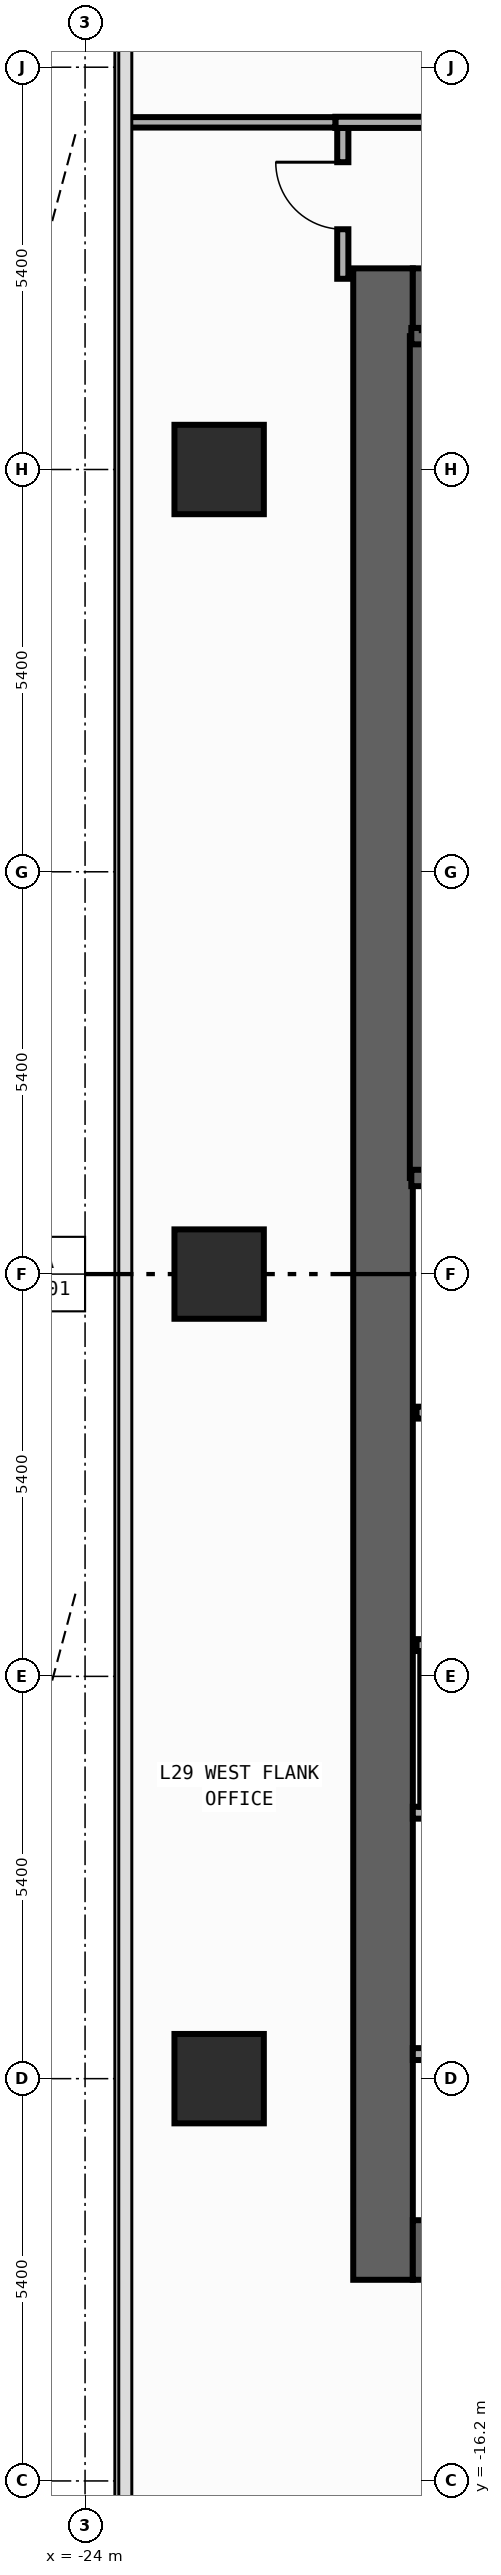
"""IFC4 building model, lengths in metres.
Left out: names, types, materials, properties, quantities, classifications, styles, units other than length and angle.
Written with IfcOpenShell. Run it as: python <this file> out.ifc"""

import sys

from ifc_helpers import new_model, si_unit, direction, frame, frame_2d, origin, origin_2d, place, context, subcontext, project, spatial, rectangle, extrude, element, fill, save


model = new_model("IFC4")
c1 = context("Model", 3, precision=1e-05, world=origin(), true_north=direction((0.0, 1.0)))
c2 = subcontext(c1, "Body", "Model", "MODEL_VIEW")
j1 = project(units=[si_unit("LENGTHUNIT", "METRE"), si_unit("PLANEANGLEUNIT", "RADIAN")], contexts=[c1])
p1 = place(None, origin())
s1 = spatial("IfcSite", under=j1, at=p1, CompositionType="ELEMENT")
p2 = place(p1, origin())
s2 = spatial("IfcBuilding", under=s1, at=p2, CompositionType="ELEMENT")
p3 = place(p2, frame((0.0, 0.0, 126.8)))
s3 = spatial("IfcBuildingStorey", under=s2, at=p3, CompositionType="ELEMENT", Elevation=126.8)
p4 = place(p3, frame((-20.0, -13.5, 0.0), z_axis=(0.0, 0.0, 1.0), x_axis=(0.0, 1.0, 0.0)))
e1 = element("IfcWall", 1, at=p4, inside=s3, PredefinedType="SHEAR", context=c2, shape_type="SweptSolid", body=[
    extrude(rectangle(XDim=27.0, YDim=0.8, at=frame_2d((13.5, 0.0))), origin(), (0.0, 0.0, 1.0), 3.94),
])
for number, where, z_axis, x_axis in (
    (2, (-19.6, -13.1, 0.0), (0.0, 0.0, 1.0), (1.0, 0.0, 0.0)),
    (3, (-19.6, 13.1, 0.0), (0.0, 0.0, 1.0), (1.0, 0.0, 0.0)),
):
    element("IfcWall", number, at=place(p3, frame(where, z_axis=z_axis, x_axis=x_axis)), inside=s3, PredefinedType="SHEAR", context=c2, shape_type="SweptSolid", body=[
        extrude(rectangle(XDim=6.8, YDim=0.8, at=frame_2d((3.4, 0.0))), origin(), (0.0, 0.0, 1.0), 3.94),
    ])
p5 = place(p3, frame((-19.53, 1.29, 0.0), z_axis=(0.0, 0.0, 1.0), x_axis=(0.0, 1.0, 0.0)))
e4 = element("IfcWall", 4, at=p5, inside=s3, PredefinedType="SHEAR", context=c2, shape_type="SweptSolid", body=[
    extrude(rectangle(XDim=11.3, YDim=0.22, at=frame_2d((5.65, 0.0))), origin(), (0.0, 0.0, 1.0), 3.94),
])
p6 = place(p3, frame((-19.62, 12.59, 0.0), z_axis=(0.0, 0.0, 1.0), x_axis=(1.0, 0.0, 0.0)))
e5 = element("IfcWall", 5, at=p6, inside=s3, PredefinedType="SHEAR", context=c2, shape_type="SweptSolid", body=[
    extrude(rectangle(XDim=3.915, YDim=0.22, at=frame_2d((1.958, 0.0))), origin(), (0.0, 0.0, 1.0), 3.94),
])
p7 = place(p3, frame((-19.62, 1.29, 0.0), z_axis=(0.0, 0.0, 1.0), x_axis=(1.0, 0.0, 0.0)))
e6 = element("IfcWall", 6, at=p7, inside=s3, PredefinedType="SHEAR", context=c2, shape_type="SweptSolid", body=[
    extrude(rectangle(XDim=3.915, YDim=0.22, at=frame_2d((1.958, 0.0))), origin(), (0.0, 0.0, 1.0), 3.94),
])
p8 = place(p7, frame((1.08, 0.0, 0.0)))
e7 = element("IfcOpeningElement", 7, at=p8, cuts=e6, PredefinedType="OPENING", context=c2, shape_type="SweptSolid", body=[
    extrude(rectangle(XDim=1.1, YDim=2.2, at=frame_2d((0.55, 1.1))), frame((0.0, 0.12, 0.0), z_axis=(0.0, -1.0, 0.0), x_axis=(1.0, 0.0, 0.0)), (0.0, 0.0, 1.0), 0.24),
])
for number, where, z_axis, x_axis in (
    (8, (-22.2, -10.8, 0.0), (0.0, 0.0, 1.0), (1.0, 0.0, 0.0)),
    (9, (-22.2, 0.0, 0.0), (0.0, 0.0, 1.0), (1.0, 0.0, 0.0)),
    (10, (-22.2, 10.8, 0.0), (0.0, 0.0, 1.0), (1.0, 0.0, 0.0)),
):
    element("IfcColumn", number, at=place(p3, frame(where, z_axis=z_axis, x_axis=x_axis)), inside=s3, PredefinedType="COLUMN", context=c2, shape_type="SweptSolid", body=[
        extrude(rectangle(XDim=1.2, YDim=1.2, at=origin_2d()), origin(), (0.0, 0.0, 1.0), 4.2),
    ])
p9 = place(p3, frame((-19.55, -1.86, 0.0), z_axis=(0.0, 0.0, 1.0), x_axis=(1.0, 0.0, 0.0)))
e11 = element("IfcWall", 11, at=p9, inside=s3, PredefinedType="STANDARD", context=c2, shape_type="SweptSolid", body=[
    extrude(rectangle(XDim=3.8, YDim=0.16, at=frame_2d((1.9, 0.0))), origin(), (0.0, 0.0, 1.0), 3.94),
])
p10 = place(p9, frame((1.18, 0.0, 0.0)))
e12 = element("IfcOpeningElement", 12, at=p10, cuts=e11, PredefinedType="OPENING", context=c2, shape_type="SweptSolid", body=[
    extrude(rectangle(XDim=1.15, YDim=2.2, at=frame_2d((0.575, 1.1))), frame((0.0, 0.09, 0.0), z_axis=(0.0, -1.0, 0.0), x_axis=(1.0, 0.0, 0.0)), (0.0, 0.0, 1.0), 0.18),
])
p11 = place(p3, frame((-19.55, -4.98, 0.0), z_axis=(0.0, 0.0, 1.0), x_axis=(1.0, 0.0, 0.0)))
e13 = element("IfcWall", 13, at=p11, inside=s3, PredefinedType="STANDARD", context=c2, shape_type="SweptSolid", body=[
    extrude(rectangle(XDim=3.8, YDim=0.16, at=frame_2d((1.9, 0.0))), origin(), (0.0, 0.0, 1.0), 3.94),
])
for number, where, z_axis, x_axis in (
    (14, (-19.6, -10.47, 0.0), (0.0, 0.0, 1.0), (1.0, 0.0, 0.0)),
    (15, (-19.6, -7.23, 0.0), (0.0, 0.0, 1.0), (1.0, 0.0, 0.0)),
):
    element("IfcWall", number, at=place(p3, frame(where, z_axis=z_axis, x_axis=x_axis)), inside=s3, PredefinedType="PARTITIONING", context=c2, shape_type="SweptSolid", body=[
        extrude(rectangle(XDim=2.29, YDim=0.16, at=frame_2d((1.145, 0.0))), origin(), (0.0, 0.0, 1.0), 3.94),
    ])
p12 = place(p3, frame((-20.54, 13.36, 0.0), z_axis=(0.0, 0.0, 1.0), x_axis=(0.0, 1.0, 0.0)))
e16 = element("IfcWall", 16, at=p12, inside=s3, PredefinedType="PARTITIONING", context=c2, shape_type="SweptSolid", body=[
    extrude(rectangle(XDim=2.025, YDim=0.15, at=frame_2d((1.012, 0.0))), origin(), (0.0, 0.0, 1.0), 3.94),
])
p13 = place(p12, frame((0.665, 0.0, 0.0)))
e17 = element("IfcOpeningElement", 17, at=p13, cuts=e16, PredefinedType="OPENING", context=c2, shape_type="SweptSolid", body=[
    extrude(rectangle(XDim=0.9, YDim=2.15, at=frame_2d((0.45, 1.075))), frame((0.0, 0.085, 0.0), z_axis=(0.0, -1.0, 0.0), x_axis=(1.0, 0.0, 0.0)), (0.0, 0.0, 1.0), 0.17),
])
p14 = place(p3, frame((-20.64, 15.46, 0.0), z_axis=(0.0, 0.0, 1.0), x_axis=(1.0, 0.0, 0.0)))
e18 = element("IfcWall", 18, at=p14, inside=s3, PredefinedType="PARTITIONING", context=c2, shape_type="SweptSolid", body=[
    extrude(rectangle(XDim=8.65, YDim=0.15, at=frame_2d((4.325, 0.0))), origin(), (0.0, 0.0, 1.0), 3.94),
])
p15 = place(p14, frame((2.871, 0.0, 0.0)))
e19 = element("IfcOpeningElement", 19, at=p15, cuts=e18, PredefinedType="OPENING", context=c2, shape_type="SweptSolid", body=[
    extrude(rectangle(XDim=0.9, YDim=2.15, at=frame_2d((0.45, 1.075))), frame((0.0, 0.085, 0.0), z_axis=(0.0, -1.0, 0.0), x_axis=(1.0, 0.0, 0.0)), (0.0, 0.0, 1.0), 0.17),
])
p16 = place(p3, frame((-23.455, 15.46, 0.0), z_axis=(0.0, 0.0, 1.0), x_axis=(1.0, 0.0, 0.0)))
e20 = element("IfcWall", 20, at=p16, inside=s3, PredefinedType="PARTITIONING", context=c2, shape_type="SweptSolid", body=[
    extrude(rectangle(XDim=2.815, YDim=0.14, at=frame_2d((1.408, 0.0))), origin(), (0.0, 0.0, 1.0), 3.94),
])
p17 = place(p3, frame((-19.45, -7.15, 0.0), z_axis=(0.0, 0.0, 1.0), x_axis=(0.0, 1.0, 0.0)))
e21 = element("IfcWall", 21, at=p17, inside=s3, PredefinedType="PARTITIONING", context=c2, shape_type="SweptSolid", body=[
    extrude(rectangle(XDim=2.09, YDim=0.1, at=frame_2d((1.045, 0.0))), origin(), (0.0, 0.0, 1.0), 3.94),
])
p18 = place(p13, origin())
e22 = element("IfcDoor", 22, at=p18, inside=s3, OperationType="SINGLE_SWING_RIGHT", PredefinedType="DOOR", context=c2, shape_type="SweptSolid", body=[
    extrude(rectangle(XDim=0.9, YDim=2.15, at=frame_2d((0.45, 1.075))), frame((0.0, 0.025, 0.0), z_axis=(0.0, -1.0, 0.0), x_axis=(1.0, 0.0, 0.0)), (0.0, 0.0, 1.0), 0.05),
])
fill(e17, e22)
save(model, sys.argv[1])
